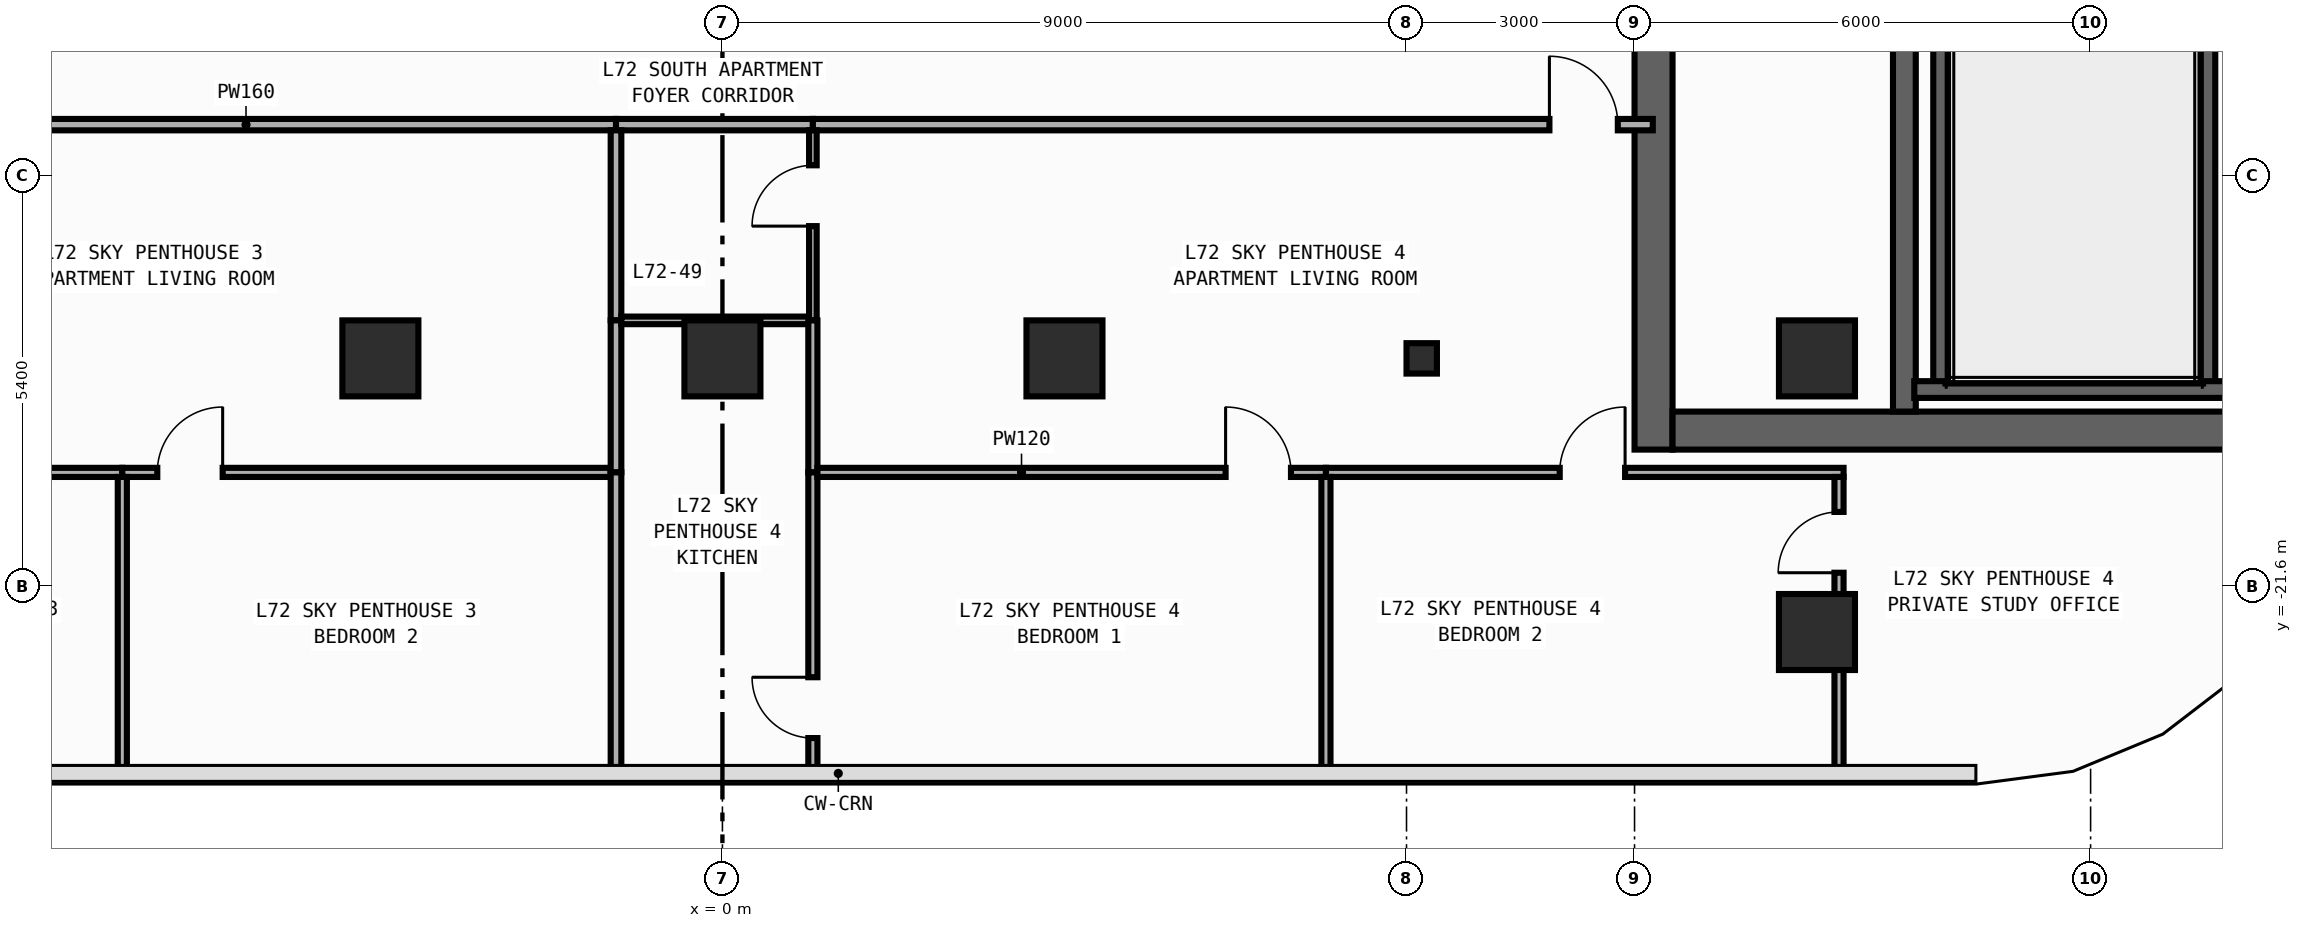
"""IFC4 building model, lengths in metres.
Left out: names, types, materials, properties, quantities, classifications, styles, units other than length and angle.
Written with IfcOpenShell. Run it as: python <this file> out.ifc"""

import sys

from ifc_helpers import new_model, si_unit, direction, frame, frame_2d, origin, origin_2d, place, context, subcontext, project, spatial, rectangle, circle, i_section, extrude, element, fill, save


model = new_model("IFC4")
c1 = context("Model", 3, precision=1e-05, world=origin(), true_north=direction((0.0, 1.0)))
c2 = subcontext(c1, "Body", "Model", "MODEL_VIEW")
j1 = project(units=[si_unit("LENGTHUNIT", "METRE"), si_unit("PLANEANGLEUNIT", "RADIAN")], contexts=[c1])
p1 = place(None, origin())
s1 = spatial("IfcSite", under=j1, at=p1, CompositionType="ELEMENT")
p2 = place(p1, origin())
s2 = spatial("IfcBuilding", under=s1, at=p2, CompositionType="ELEMENT")
p3 = place(p2, frame((0.0, 0.0, 300.4)))
s3 = spatial("IfcBuildingStorey", under=s2, at=p3, CompositionType="ELEMENT", Elevation=300.4)
p4 = place(p3, frame((12.25, -19.8, 0.0), z_axis=(0.0, 0.0, 1.0), x_axis=(0.0, 1.0, 0.0)))
e1 = element("IfcWall", 1, at=p4, inside=s3, PredefinedType="SHEAR", context=c2, shape_type="SweptSolid", body=[
    extrude(rectangle(XDim=27.0, YDim=0.5, at=frame_2d((13.5, 0.0))), origin(), (0.0, 0.0, 1.0), 3.54),
])
p5 = place(p4, frame((23.05, 0.0, 0.0)))
e2 = element("IfcOpeningElement", 2, at=p5, cuts=e1, PredefinedType="OPENING", context=c2, shape_type="SweptSolid", body=[
    extrude(rectangle(XDim=1.1, YDim=2.2, at=frame_2d((0.55, 1.1))), frame((0.0, 0.26, 0.0), z_axis=(0.0, -1.0, 0.0), x_axis=(1.0, 0.0, 0.0)), (0.0, 0.0, 1.0), 0.52),
])
p6 = place(p4, frame((19.85, 0.0, 0.0)))
e3 = element("IfcOpeningElement", 3, at=p6, cuts=e1, PredefinedType="OPENING", context=c2, shape_type="SweptSolid", body=[
    extrude(rectangle(XDim=1.1, YDim=2.2, at=frame_2d((0.55, 1.1))), frame((0.0, 0.26, 0.0), z_axis=(0.0, -1.0, 0.0), x_axis=(1.0, 0.0, 0.0)), (0.0, 0.0, 1.0), 0.52),
])
p7 = place(p4, frame((16.65, 0.0, 0.0)))
e4 = element("IfcOpeningElement", 4, at=p7, cuts=e1, PredefinedType="OPENING", context=c2, shape_type="SweptSolid", body=[
    extrude(rectangle(XDim=1.1, YDim=2.2, at=frame_2d((0.55, 1.1))), frame((0.0, 0.26, 0.0), z_axis=(0.0, -1.0, 0.0), x_axis=(1.0, 0.0, 0.0)), (0.0, 0.0, 1.0), 0.52),
])
p8 = place(p4, frame((7.175, 0.0, 0.0)))
e5 = element("IfcOpeningElement", 5, at=p8, cuts=e1, PredefinedType="OPENING", context=c2, shape_type="SweptSolid", body=[
    extrude(rectangle(XDim=0.85, YDim=2.1, at=frame_2d((0.425, 1.05))), frame((0.0, 0.26, 0.0), z_axis=(0.0, -1.0, 0.0), x_axis=(1.0, 0.0, 0.0)), (0.0, 0.0, 1.0), 0.52),
])
p9 = place(p4, frame((10.375, 0.0, 0.0)))
e6 = element("IfcOpeningElement", 6, at=p9, cuts=e1, PredefinedType="OPENING", context=c2, shape_type="SweptSolid", body=[
    extrude(rectangle(XDim=0.85, YDim=2.1, at=frame_2d((0.425, 1.05))), frame((0.0, 0.26, 0.0), z_axis=(0.0, -1.0, 0.0), x_axis=(1.0, 0.0, 0.0)), (0.0, 0.0, 1.0), 0.52),
])
p10 = place(p4, frame((12.725, 0.0, 0.0)))
e7 = element("IfcOpeningElement", 7, at=p10, cuts=e1, PredefinedType="OPENING", context=c2, shape_type="SweptSolid", body=[
    extrude(rectangle(XDim=1.15, YDim=2.2, at=frame_2d((0.575, 1.1))), frame((0.0, 0.26, 0.0), z_axis=(0.0, -1.0, 0.0), x_axis=(1.0, 0.0, 0.0)), (0.0, 0.0, 1.0), 0.52),
])
p11 = place(p4, frame((25.125, 0.0, 0.0)))
e8 = element("IfcOpeningElement", 8, at=p11, cuts=e1, PredefinedType="OPENING", context=c2, shape_type="SweptSolid", body=[
    extrude(rectangle(XDim=0.85, YDim=2.1, at=frame_2d((0.425, 1.05))), frame((0.0, 0.26, 0.0), z_axis=(0.0, -1.0, 0.0), x_axis=(1.0, 0.0, 0.0)), (0.0, 0.0, 1.0), 0.52),
])
p12 = place(p3, frame((12.5, -19.55, 0.0), z_axis=(0.0, 0.0, 1.0), x_axis=(1.0, 0.0, 0.0)))
e9 = element("IfcWall", 9, at=p12, inside=s3, PredefinedType="SHEAR", context=c2, shape_type="SweptSolid", body=[
    extrude(rectangle(XDim=7.4, YDim=0.5, at=frame_2d((3.7, 0.0))), origin(), (0.0, 0.0, 1.0), 3.54),
])
p13 = place(p3, frame((15.55, -19.3, 0.0), z_axis=(0.0, 0.0, 1.0), x_axis=(0.0, 1.0, 0.0)))
e10 = element("IfcWall", 10, at=p13, inside=s3, PredefinedType="SHEAR", context=c2, shape_type="SweptSolid", body=[
    extrude(rectangle(XDim=26.0, YDim=0.3, at=frame_2d((13.0, 0.0))), origin(), (0.0, 0.0, 1.0), 3.54),
])
p14 = place(p13, frame((12.225, 0.0, 0.0)))
e11 = element("IfcOpeningElement", 11, at=p14, cuts=e10, PredefinedType="OPENING", context=c2, shape_type="SweptSolid", body=[
    extrude(rectangle(XDim=1.15, YDim=2.2, at=frame_2d((0.575, 1.1))), frame((0.0, 0.16, 0.0), z_axis=(0.0, -1.0, 0.0), x_axis=(1.0, 0.0, 0.0)), (0.0, 0.0, 1.0), 0.32),
])
p15 = place(p13, frame((24.625, 0.0, 0.0)))
e12 = element("IfcOpeningElement", 12, at=p15, cuts=e10, PredefinedType="OPENING", context=c2, shape_type="SweptSolid", body=[
    extrude(rectangle(XDim=0.85, YDim=2.1, at=frame_2d((0.425, 1.05))), frame((0.0, 0.16, 0.0), z_axis=(0.0, -1.0, 0.0), x_axis=(1.0, 0.0, 0.0)), (0.0, 0.0, 1.0), 0.32),
])
for number, where, z_axis, x_axis in (
    (13, (16.04, -19.01, 0.0), (0.0, 0.0, 1.0), (0.0, 1.0, 0.0)),
    (14, (19.53, -19.01, 0.0), (0.0, 0.0, 1.0), (0.0, 1.0, 0.0)),
):
    element("IfcWall", number, at=place(p3, frame(where, z_axis=z_axis, x_axis=x_axis)), inside=s3, PredefinedType="SHEAR", context=c2, shape_type="SweptSolid", body=[
        extrude(rectangle(XDim=11.42, YDim=0.22, at=frame_2d((5.71, 0.0))), origin(), (0.0, 0.0, 1.0), 3.54),
    ])
p16 = place(p3, frame((15.68, -19.01, 0.0), z_axis=(0.0, 0.0, 1.0), x_axis=(1.0, 0.0, 0.0)))
e15 = element("IfcWall", 15, at=p16, inside=s3, PredefinedType="SHEAR", context=c2, shape_type="SweptSolid", body=[
    extrude(rectangle(XDim=4.24, YDim=0.22, at=frame_2d((2.12, 0.0))), origin(), (0.0, 0.0, 1.0), 3.54),
])
p17 = place(p3, frame((9.2, -18.6, 0.0), z_axis=(0.0, 0.0, 1.0), x_axis=(1.0, 0.0, 0.0)))
e16 = element("IfcColumn", 16, at=p17, inside=s3, PredefinedType="COLUMN", context=c2, shape_type="SweptSolid", body=[
    extrude(i_section(OverallWidth=0.4, OverallDepth=0.4, WebThickness=0.013, FlangeThickness=0.021, FilletRadius=0.022, at=origin_2d()), origin(), (0.0, 0.0, 1.0), 3.8),
])
for number, where, z_axis, x_axis in (
    (17, (14.4, -18.6, 0.0), (0.0, 0.0, 1.0), (1.0, 0.0, 0.0)),
    (18, (-4.5, -18.6, 0.0), (0.0, 0.0, 1.0), (1.0, 0.0, 0.0)),
    (19, (0.0, -18.6, 0.0), (0.0, 0.0, 1.0), (1.0, 0.0, 0.0)),
    (20, (4.5, -18.6, 0.0), (0.0, 0.0, 1.0), (1.0, 0.0, 0.0)),
    (21, (14.4, -22.2, 0.0), (0.0, 0.0, 1.0), (1.0, 0.0, 0.0)),
):
    element("IfcColumn", number, at=place(p3, frame(where, z_axis=z_axis, x_axis=x_axis)), inside=s3, PredefinedType="COLUMN", context=c2, shape_type="SweptSolid", body=[
        extrude(circle(Radius=0.5, at=origin_2d()), origin(), (0.0, 0.0, 1.0), 3.8),
    ])
p18 = place(p3, frame((-14.31, -15.525, 0.0), z_axis=(0.0, 0.0, 1.0), x_axis=(1.0, 0.0, 0.0)))
e22 = element("IfcWall", 22, at=p18, inside=s3, PredefinedType="PARTITIONING", context=c2, shape_type="SweptSolid", body=[
    extrude(rectangle(XDim=12.91, YDim=0.15, at=frame_2d((6.455, 0.0))), origin(), (0.0, 0.0, 1.0), 3.54),
])
p19 = place(p18, frame((2.275, 0.0, 0.0)))
e23 = element("IfcOpeningElement", 23, at=p19, cuts=e22, PredefinedType="OPENING", context=c2, shape_type="SweptSolid", body=[
    extrude(rectangle(XDim=0.9, YDim=2.15, at=frame_2d((0.45, 1.075))), frame((0.0, 0.085, 0.0), z_axis=(0.0, -1.0, 0.0), x_axis=(1.0, 0.0, 0.0)), (0.0, 0.0, 1.0), 0.17),
])
p20 = place(p3, frame((-1.4, -15.525, 0.0), z_axis=(0.0, 0.0, 1.0), x_axis=(1.0, 0.0, 0.0)))
e24 = element("IfcWall", 24, at=p20, inside=s3, PredefinedType="PARTITIONING", context=c2, shape_type="SweptSolid", body=[
    extrude(rectangle(XDim=2.59, YDim=0.15, at=frame_2d((1.295, 0.0))), origin(), (0.0, 0.0, 1.0), 3.54),
])
p21 = place(p3, frame((1.19, -15.525, 0.0), z_axis=(0.0, 0.0, 1.0), x_axis=(1.0, 0.0, 0.0)))
e25 = element("IfcWall", 25, at=p21, inside=s3, PredefinedType="PARTITIONING", context=c2, shape_type="SweptSolid", body=[
    extrude(rectangle(XDim=11.05, YDim=0.15, at=frame_2d((5.525, 0.0))), origin(), (0.0, 0.0, 1.0), 3.54),
])
p22 = place(p21, frame((9.69, 0.0, 0.0)))
e26 = element("IfcOpeningElement", 26, at=p22, cuts=e25, PredefinedType="OPENING", context=c2, shape_type="SweptSolid", body=[
    extrude(rectangle(XDim=0.9, YDim=2.15, at=frame_2d((0.45, 1.075))), frame((0.0, 0.085, 0.0), z_axis=(0.0, -1.0, 0.0), x_axis=(1.0, 0.0, 0.0)), (0.0, 0.0, 1.0), 0.17),
])
p23 = place(p3, frame((-14.25, -20.1, 0.0), z_axis=(0.0, 0.0, 1.0), x_axis=(1.0, 0.0, 0.0)))
e27 = element("IfcWall", 27, at=p23, inside=s3, PredefinedType="PARTITIONING", context=c2, shape_type="SweptSolid", body=[
    extrude(rectangle(XDim=6.355, YDim=0.12, at=frame_2d((3.177, 0.0))), origin(), (0.0, 0.0, 1.0), 3.54),
])
p24 = place(p23, frame((2.124, 0.0, 0.0)))
e28 = element("IfcOpeningElement", 28, at=p24, cuts=e27, PredefinedType="OPENING", context=c2, shape_type="SweptSolid", body=[
    extrude(rectangle(XDim=0.86, YDim=2.15, at=frame_2d((0.43, 1.075))), frame((0.0, 0.07, 0.0), z_axis=(0.0, -1.0, 0.0), x_axis=(1.0, 0.0, 0.0)), (0.0, 0.0, 1.0), 0.14),
])
p25 = place(p3, frame((-7.895, -20.1, 0.0), z_axis=(0.0, 0.0, 1.0), x_axis=(1.0, 0.0, 0.0)))
e29 = element("IfcWall", 29, at=p25, inside=s3, PredefinedType="PARTITIONING", context=c2, shape_type="SweptSolid", body=[
    extrude(rectangle(XDim=6.425, YDim=0.12, at=frame_2d((3.212, 0.0))), origin(), (0.0, 0.0, 1.0), 3.54),
])
p26 = place(p25, frame((0.46, 0.0, 0.0)))
e30 = element("IfcOpeningElement", 30, at=p26, cuts=e29, PredefinedType="OPENING", context=c2, shape_type="SweptSolid", body=[
    extrude(rectangle(XDim=0.86, YDim=2.15, at=frame_2d((0.43, 1.075))), frame((0.0, 0.07, 0.0), z_axis=(0.0, -1.0, 0.0), x_axis=(1.0, 0.0, 0.0)), (0.0, 0.0, 1.0), 0.14),
])
p27 = place(p3, frame((-1.4, -18.1, 0.0), z_axis=(0.0, 0.0, 1.0), x_axis=(0.0, 1.0, 0.0)))
e31 = element("IfcWall", 31, at=p27, inside=s3, PredefinedType="PARTITIONING", context=c2, shape_type="SweptSolid", body=[
    extrude(rectangle(XDim=2.5, YDim=0.14, at=frame_2d((1.25, 0.0))), origin(), (0.0, 0.0, 1.0), 3.54),
])
p28 = place(p3, frame((-1.4, -20.1, 0.0), z_axis=(0.0, 0.0, 1.0), x_axis=(0.0, 1.0, 0.0)))
e32 = element("IfcWall", 32, at=p28, inside=s3, PredefinedType="PARTITIONING", context=c2, shape_type="SweptSolid", body=[
    extrude(rectangle(XDim=2.0, YDim=0.14, at=frame_2d((1.0, 0.0))), origin(), (0.0, 0.0, 1.0), 3.54),
])
p29 = place(p3, frame((-7.895, -24.055, 0.0), z_axis=(0.0, 0.0, 1.0), x_axis=(0.0, 1.0, 0.0)))
e33 = element("IfcWall", 33, at=p29, inside=s3, PredefinedType="PARTITIONING", context=c2, shape_type="SweptSolid", body=[
    extrude(rectangle(XDim=3.895, YDim=0.12, at=frame_2d((1.948, 0.0))), origin(), (0.0, 0.0, 1.0), 3.54),
])
p30 = place(p3, frame((-1.4, -24.055, 0.0), z_axis=(0.0, 0.0, 1.0), x_axis=(0.0, 1.0, 0.0)))
e34 = element("IfcWall", 34, at=p30, inside=s3, PredefinedType="PARTITIONING", context=c2, shape_type="SweptSolid", body=[
    extrude(rectangle(XDim=3.955, YDim=0.14, at=frame_2d((1.978, 0.0))), origin(), (0.0, 0.0, 1.0), 3.54),
])
p31 = place(p3, frame((-1.33, -18.1, 0.0), z_axis=(0.0, 0.0, 1.0), x_axis=(1.0, 0.0, 0.0)))
e35 = element("IfcWall", 35, at=p31, inside=s3, PredefinedType="PARTITIONING", context=c2, shape_type="SweptSolid", body=[
    extrude(rectangle(XDim=2.47, YDim=0.1, at=frame_2d((1.235, 0.0))), origin(), (0.0, 0.0, 1.0), 3.54),
])
p32 = place(p3, frame((1.19, -18.1, 0.0), z_axis=(0.0, 0.0, 1.0), x_axis=(0.0, 1.0, 0.0)))
e36 = element("IfcWall", 36, at=p32, inside=s3, PredefinedType="PARTITIONING", context=c2, shape_type="SweptSolid", body=[
    extrude(rectangle(XDim=2.5, YDim=0.1, at=frame_2d((1.25, 0.0))), origin(), (0.0, 0.0, 1.0), 3.54),
])
p33 = place(p32, frame((1.24, 0.0, 0.0)))
e37 = element("IfcOpeningElement", 37, at=p33, cuts=e36, PredefinedType="OPENING", context=c2, shape_type="SweptSolid", body=[
    extrude(rectangle(XDim=0.8, YDim=2.1, at=frame_2d((0.4, 1.05))), frame((0.0, 0.06, 0.0), z_axis=(0.0, -1.0, 0.0), x_axis=(1.0, 0.0, 0.0)), (0.0, 0.0, 1.0), 0.12),
])
p34 = place(p3, frame((1.19, -20.1, 0.0), z_axis=(0.0, 0.0, 1.0), x_axis=(0.0, 1.0, 0.0)))
e38 = element("IfcWall", 38, at=p34, inside=s3, PredefinedType="PARTITIONING", context=c2, shape_type="SweptSolid", body=[
    extrude(rectangle(XDim=2.0, YDim=0.12, at=frame_2d((1.0, 0.0))), origin(), (0.0, 0.0, 1.0), 3.54),
])
p35 = place(p3, frame((1.19, -24.055, 0.0), z_axis=(0.0, 0.0, 1.0), x_axis=(0.0, 1.0, 0.0)))
e39 = element("IfcWall", 39, at=p35, inside=s3, PredefinedType="PARTITIONING", context=c2, shape_type="SweptSolid", body=[
    extrude(rectangle(XDim=3.955, YDim=0.12, at=frame_2d((1.978, 0.0))), origin(), (0.0, 0.0, 1.0), 3.54),
])
p36 = place(p35, frame((0.46, 0.0, 0.0)))
e40 = element("IfcOpeningElement", 40, at=p36, cuts=e39, PredefinedType="OPENING", context=c2, shape_type="SweptSolid", body=[
    extrude(rectangle(XDim=0.8, YDim=2.1, at=frame_2d((0.4, 1.05))), frame((0.0, 0.07, 0.0), z_axis=(0.0, -1.0, 0.0), x_axis=(1.0, 0.0, 0.0)), (0.0, 0.0, 1.0), 0.14),
])
p37 = place(p3, frame((1.25, -20.1, 0.0), z_axis=(0.0, 0.0, 1.0), x_axis=(1.0, 0.0, 0.0)))
e41 = element("IfcWall", 41, at=p37, inside=s3, PredefinedType="PARTITIONING", context=c2, shape_type="SweptSolid", body=[
    extrude(rectangle(XDim=6.69, YDim=0.12, at=frame_2d((3.345, 0.0))), origin(), (0.0, 0.0, 1.0), 3.54),
])
p38 = place(p37, frame((5.37, 0.0, 0.0)))
e42 = element("IfcOpeningElement", 42, at=p38, cuts=e41, PredefinedType="OPENING", context=c2, shape_type="SweptSolid", body=[
    extrude(rectangle(XDim=0.86, YDim=2.15, at=frame_2d((0.43, 1.075))), frame((0.0, 0.07, 0.0), z_axis=(0.0, -1.0, 0.0), x_axis=(1.0, 0.0, 0.0)), (0.0, 0.0, 1.0), 0.14),
])
p39 = place(p3, frame((7.94, -20.1, 0.0), z_axis=(0.0, 0.0, 1.0), x_axis=(1.0, 0.0, 0.0)))
e43 = element("IfcWall", 43, at=p39, inside=s3, PredefinedType="PARTITIONING", context=c2, shape_type="SweptSolid", body=[
    extrude(rectangle(XDim=6.81, YDim=0.12, at=frame_2d((3.405, 0.0))), origin(), (0.0, 0.0, 1.0), 3.54),
])
p40 = place(p39, frame((3.076, 0.0, 0.0)))
e44 = element("IfcOpeningElement", 44, at=p40, cuts=e43, PredefinedType="OPENING", context=c2, shape_type="SweptSolid", body=[
    extrude(rectangle(XDim=0.86, YDim=2.15, at=frame_2d((0.43, 1.075))), frame((0.0, 0.07, 0.0), z_axis=(0.0, -1.0, 0.0), x_axis=(1.0, 0.0, 0.0)), (0.0, 0.0, 1.0), 0.14),
])
p41 = place(p3, frame((14.69, -24.055, 0.0), z_axis=(0.0, 0.0, 1.0), x_axis=(0.0, 1.0, 0.0)))
e45 = element("IfcWall", 45, at=p41, inside=s3, PredefinedType="PARTITIONING", context=c2, shape_type="SweptSolid", body=[
    extrude(rectangle(XDim=3.895, YDim=0.12, at=frame_2d((1.948, 0.0))), origin(), (0.0, 0.0, 1.0), 2.64),
])
p42 = place(p41, frame((2.635, 0.0, 0.0)))
e46 = element("IfcOpeningElement", 46, at=p42, cuts=e45, PredefinedType="OPENING", context=c2, shape_type="SweptSolid", body=[
    extrude(rectangle(XDim=0.8, YDim=2.1, at=frame_2d((0.4, 1.05))), frame((0.0, 0.07, 0.0), z_axis=(0.0, -1.0, 0.0), x_axis=(1.0, 0.0, 0.0)), (0.0, 0.0, 1.0), 0.14),
])
p43 = place(p3, frame((7.94, -24.055, 0.0), z_axis=(0.0, 0.0, 1.0), x_axis=(0.0, 1.0, 0.0)))
e47 = element("IfcWall", 47, at=p43, inside=s3, PredefinedType="PARTITIONING", context=c2, shape_type="SweptSolid", body=[
    extrude(rectangle(XDim=3.895, YDim=0.12, at=frame_2d((1.948, 0.0))), origin(), (0.0, 0.0, 1.0), 3.54),
])
p44 = place(p22, origin())
e48 = element("IfcDoor", 48, at=p44, inside=s3, OperationType="SINGLE_SWING_LEFT", PredefinedType="DOOR", context=c2, shape_type="SweptSolid", body=[
    extrude(rectangle(XDim=0.9, YDim=2.15, at=frame_2d((0.45, 1.075))), frame((0.0, 0.025, 0.0), z_axis=(0.0, -1.0, 0.0), x_axis=(1.0, 0.0, 0.0)), (0.0, 0.0, 1.0), 0.05),
])
fill(e26, e48)
p45 = place(p26, origin())
e49 = element("IfcDoor", 49, at=p45, inside=s3, OperationType="SINGLE_SWING_RIGHT", PredefinedType="DOOR", context=c2, shape_type="SweptSolid", body=[
    extrude(rectangle(XDim=0.86, YDim=2.15, at=frame_2d((0.43, 1.075))), frame((0.0, 0.025, 0.0), z_axis=(0.0, -1.0, 0.0), x_axis=(1.0, 0.0, 0.0)), (0.0, 0.0, 1.0), 0.05),
])
fill(e30, e49)
p46 = place(p33, origin())
e50 = element("IfcDoor", 50, at=p46, inside=s3, OperationType="SINGLE_SWING_LEFT", PredefinedType="DOOR", context=c2, shape_type="SweptSolid", body=[
    extrude(rectangle(XDim=0.8, YDim=2.1, at=frame_2d((0.4, 1.05))), frame((0.0, 0.025, 0.0), z_axis=(0.0, -1.0, 0.0), x_axis=(1.0, 0.0, 0.0)), (0.0, 0.0, 1.0), 0.05),
])
fill(e37, e50)
p47 = place(p38, origin())
e51 = element("IfcDoor", 51, at=p47, inside=s3, OperationType="SINGLE_SWING_LEFT", PredefinedType="DOOR", context=c2, shape_type="SweptSolid", body=[
    extrude(rectangle(XDim=0.86, YDim=2.15, at=frame_2d((0.43, 1.075))), frame((0.0, 0.025, 0.0), z_axis=(0.0, -1.0, 0.0), x_axis=(1.0, 0.0, 0.0)), (0.0, 0.0, 1.0), 0.05),
])
fill(e42, e51)
p48 = place(p40, origin())
e52 = element("IfcDoor", 52, at=p48, inside=s3, OperationType="SINGLE_SWING_RIGHT", PredefinedType="DOOR", context=c2, shape_type="SweptSolid", body=[
    extrude(rectangle(XDim=0.86, YDim=2.15, at=frame_2d((0.43, 1.075))), frame((0.0, 0.025, 0.0), z_axis=(0.0, -1.0, 0.0), x_axis=(1.0, 0.0, 0.0)), (0.0, 0.0, 1.0), 0.05),
])
fill(e44, e52)
p49 = place(p36, origin())
e53 = element("IfcDoor", 53, at=p49, inside=s3, OperationType="SINGLE_SWING_RIGHT", PredefinedType="DOOR", context=c2, shape_type="SweptSolid", body=[
    extrude(rectangle(XDim=0.8, YDim=2.1, at=frame_2d((0.4, 1.05))), frame((0.0, 0.025, 0.0), z_axis=(0.0, -1.0, 0.0), x_axis=(1.0, 0.0, 0.0)), (0.0, 0.0, 1.0), 0.05),
])
fill(e40, e53)
p50 = place(p42, origin())
e54 = element("IfcDoor", 54, at=p50, inside=s3, OperationType="SINGLE_SWING_LEFT", PredefinedType="DOOR", context=c2, shape_type="SweptSolid", body=[
    extrude(rectangle(XDim=0.8, YDim=2.1, at=frame_2d((0.4, 1.05))), frame((0.0, 0.025, 0.0), z_axis=(0.0, -1.0, 0.0), x_axis=(1.0, 0.0, 0.0)), (0.0, 0.0, 1.0), 0.05),
])
fill(e46, e54)
save(model, sys.argv[1])
